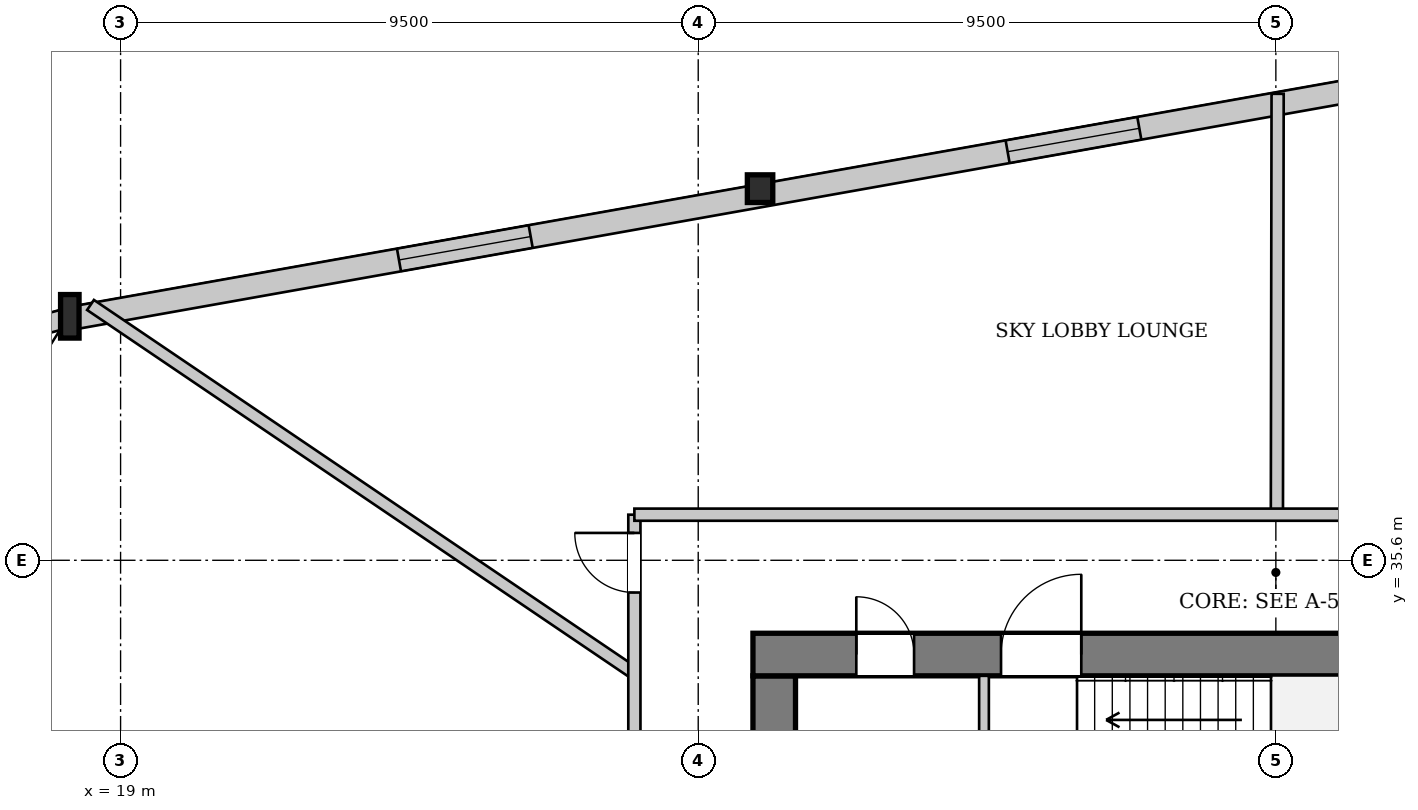
"""IFC4 building model, lengths in metres.
Left out: names, types, materials, properties, quantities, classifications, styles, units other than length and angle.
Written with IfcOpenShell. Run it as: python <this file> out.ifc"""

import sys

from ifc_helpers import new_model, si_unit, direction, frame, frame_2d, origin, origin_2d, place, context, subcontext, project, spatial, rectangle, i_section, extrude, source, transform, mapped, element, fill, save


model = new_model("IFC4")
c1 = context("Model", 3, precision=1e-05, world=origin(), true_north=direction((0.0, 1.0)))
c2 = subcontext(c1, "Body", "Model", "MODEL_VIEW")
j1 = project(units=[si_unit("LENGTHUNIT", "METRE"), si_unit("PLANEANGLEUNIT", "RADIAN")], contexts=[c1])
p1 = place(None, origin())
s1 = spatial("IfcSite", under=j1, at=p1, CompositionType="ELEMENT")
p2 = place(p1, origin())
s2 = spatial("IfcBuilding", under=s1, at=p2, CompositionType="ELEMENT")
p3 = place(p2, frame((0.0, 0.0, 138.1)))
s3 = spatial("IfcBuildingStorey", under=s2, at=p3, CompositionType="ELEMENT", Elevation=138.1)
m1 = source(origin(), c2, "Body", "SweptSolid", [
    extrude(i_section(OverallWidth=0.418, OverallDepth=0.455, WebThickness=0.038, FlangeThickness=0.059, at=origin_2d()), origin(), (0.0, 0.0, 1.0), 3.847),
])
p4 = place(p3, frame((29.633, 41.809, 0.0), z_axis=(-0.06041801268, -0.050454117732, 0.996897209219), x_axis=(0.640977101673, -0.767560000997, 0.0)))
e1 = element("IfcColumn", 1, at=p4, inside=s3, PredefinedType="COLUMN", context=c2, shape_type="MappedRepresentation", body=[
    mapped(m1, transform((0.0, 0.0, 0.0), x_axis=(1.0, 0.0, 0.0), y_axis=(0.0, 1.0, 0.0), z_axis=(0.0, 0.0, 1.0), scale=1.0)),
])
m2 = source(origin(), c2, "Body", "SweptSolid", [
    extrude(i_section(OverallWidth=0.304, OverallDepth=0.716, WebThickness=0.021, FlangeThickness=0.04, at=origin_2d()), origin(), (0.0, 0.0, 1.0), 3.855),
])
p5 = place(p3, frame((18.259, 39.786, 0.0), z_axis=(-0.048951982547, -0.089924728611, 0.994744814809), x_axis=(0.878297104228, -0.478115254625, 0.0)))
e2 = element("IfcColumn", 2, at=p5, inside=s3, PredefinedType="COLUMN", context=c2, shape_type="MappedRepresentation", body=[
    mapped(m2, transform((0.0, 0.0, 0.0), x_axis=(1.0, 0.0, 0.0), y_axis=(0.0, 1.0, 0.0), z_axis=(0.0, 0.0, 1.0), scale=1.0)),
])
p6 = place(p3, frame((19.829, 17.95, 0.0), z_axis=(0.0, 0.0, 1.0), x_axis=(-0.22713293769, 0.973863762862, 0.0)))
e3 = element("IfcWall", 3, at=p6, inside=s3, PredefinedType="SOLIDWALL", context=c2, shape_type="SweptSolid", body=[
    extrude(rectangle(XDim=18.042, YDim=0.38, at=frame_2d((9.021, 0.0))), origin(), (0.0, 0.0, 1.0), 2.972),
])
p7 = place(p6, frame((3.952, 0.0, 0.602)))
e4 = element("IfcOpeningElement", 4, at=p7, cuts=e3, PredefinedType="OPENING", context=c2, shape_type="SweptSolid", body=[
    extrude(rectangle(XDim=2.2, YDim=2.25, at=frame_2d((1.1, 1.125))), frame((0.0, 0.2, 0.0), z_axis=(0.0, -1.0, 0.0), x_axis=(1.0, 0.0, 0.0)), (0.0, 0.0, 1.0), 0.4),
])
p8 = place(p6, frame((11.89, 0.0, 0.602)))
e5 = element("IfcOpeningElement", 5, at=p8, cuts=e3, PredefinedType="OPENING", context=c2, shape_type="SweptSolid", body=[
    extrude(rectangle(XDim=2.2, YDim=2.25, at=frame_2d((1.1, 1.125))), frame((0.0, 0.2, 0.0), z_axis=(0.0, -1.0, 0.0), x_axis=(1.0, 0.0, 0.0)), (0.0, 0.0, 1.0), 0.4),
])
p9 = place(p3, frame((14.956, 38.729, 0.0), z_axis=(0.0, 0.0, 1.0), x_axis=(0.965504765996, 0.260385381385, 0.0)))
e6 = element("IfcWall", 6, at=p9, inside=s3, PredefinedType="SOLIDWALL", context=c2, shape_type="SweptSolid", body=[
    extrude(rectangle(XDim=3.465, YDim=0.32, at=frame_2d((1.732, 0.0))), origin(), (0.0, 0.0, 1.0), 2.972),
])
p10 = place(p9, frame((0.982, 0.0, 0.552)))
e7 = element("IfcOpeningElement", 7, at=p10, cuts=e6, PredefinedType="OPENING", context=c2, shape_type="SweptSolid", body=[
    extrude(rectangle(XDim=1.5, YDim=2.3, at=frame_2d((0.75, 1.15))), frame((0.0, 0.17, 0.0), z_axis=(0.0, -1.0, 0.0), x_axis=(1.0, 0.0, 0.0)), (0.0, 0.0, 1.0), 0.34),
])
p11 = place(p3, frame((18.292, 39.598, 0.0), z_axis=(0.0, 0.0, 1.0), x_axis=(0.98454939434, 0.175107081823, 0.0)))
e8 = element("IfcWall", 8, at=p11, inside=s3, PredefinedType="SOLIDWALL", context=c2, shape_type="SweptSolid", body=[
    extrude(rectangle(XDim=23.105, YDim=0.38, at=frame_2d((11.553, 0.0))), origin(), (0.0, 0.0, 1.0), 2.972),
])
p12 = place(p11, frame((5.369, 0.0, 0.602)))
e9 = element("IfcOpeningElement", 9, at=p12, cuts=e8, PredefinedType="OPENING", context=c2, shape_type="SweptSolid", body=[
    extrude(rectangle(XDim=2.2, YDim=2.25, at=frame_2d((1.1, 1.125))), frame((0.0, 0.2, 0.0), z_axis=(0.0, -1.0, 0.0), x_axis=(1.0, 0.0, 0.0)), (0.0, 0.0, 1.0), 0.4),
])
p13 = place(p11, frame((15.536, 0.0, 0.602)))
e10 = element("IfcOpeningElement", 10, at=p13, cuts=e8, PredefinedType="OPENING", context=c2, shape_type="SweptSolid", body=[
    extrude(rectangle(XDim=2.2, YDim=2.25, at=frame_2d((1.1, 1.125))), frame((0.0, 0.2, 0.0), z_axis=(0.0, -1.0, 0.0), x_axis=(1.0, 0.0, 0.0)), (0.0, 0.0, 1.0), 0.4),
])
p14 = place(p3, frame((29.75, 19.5, 0.0), z_axis=(0.0, 0.0, 1.0), x_axis=(0.0, 1.0, 0.0)))
e11 = element("IfcWall", 11, at=p14, inside=s3, PredefinedType="SHEAR", context=c2, shape_type="SweptSolid", body=[
    extrude(rectangle(XDim=14.2, YDim=0.7, at=frame_2d((7.1, 0.0))), origin(), (0.0, 0.0, 1.0), 3.58),
])
p15 = place(p14, frame((7.42, 0.0, 0.0)))
e12 = element("IfcOpeningElement", 12, at=p15, cuts=e11, PredefinedType="OPENING", context=c2, shape_type="SweptSolid", body=[
    extrude(rectangle(XDim=1.6, YDim=2.2, at=frame_2d((0.8, 1.1))), frame((0.0, 0.36, 0.0), z_axis=(0.0, -1.0, 0.0), x_axis=(1.0, 0.0, 0.0)), (0.0, 0.0, 1.0), 0.72),
])
p16 = place(p3, frame((29.4, 34.05, 0.0), z_axis=(0.0, 0.0, 1.0), x_axis=(1.0, 0.0, 0.0)))
e13 = element("IfcWall", 13, at=p16, inside=s3, PredefinedType="SHEAR", context=c2, shape_type="SweptSolid", body=[
    extrude(rectangle(XDim=17.2, YDim=0.7, at=frame_2d((8.6, 0.0))), origin(), (0.0, 0.0, 1.0), 3.58),
])
p17 = place(p16, frame((1.7, 0.0, 0.0)))
e14 = element("IfcOpeningElement", 14, at=p17, cuts=e13, PredefinedType="OPENING", context=c2, shape_type="SweptSolid", body=[
    extrude(rectangle(XDim=0.95, YDim=2.1, at=frame_2d((0.475, 1.05))), frame((0.0, 0.36, 0.0), z_axis=(0.0, -1.0, 0.0), x_axis=(1.0, 0.0, 0.0)), (0.0, 0.0, 1.0), 0.72),
])
p18 = place(p16, frame((4.08, 0.0, 0.0)))
e15 = element("IfcOpeningElement", 15, at=p18, cuts=e13, PredefinedType="OPENING", context=c2, shape_type="SweptSolid", body=[
    extrude(rectangle(XDim=1.32, YDim=2.2, at=frame_2d((0.66, 1.1))), frame((0.0, 0.36, 0.0), z_axis=(0.0, -1.0, 0.0), x_axis=(1.0, 0.0, 0.0)), (0.0, 0.0, 1.0), 0.72),
])
p19 = place(p16, frame((15.15, 0.0, 0.0)))
e16 = element("IfcOpeningElement", 16, at=p19, cuts=e13, PredefinedType="OPENING", context=c2, shape_type="SweptSolid", body=[
    extrude(rectangle(XDim=0.95, YDim=2.1, at=frame_2d((0.475, 1.05))), frame((0.0, 0.36, 0.0), z_axis=(0.0, -1.0, 0.0), x_axis=(1.0, 0.0, 0.0)), (0.0, 0.0, 1.0), 0.72),
])
p20 = place(p3, frame((33.2, 28.44, 0.0), z_axis=(0.0, 0.0, 1.0), x_axis=(0.0, 1.0, 0.0)))
e17 = element("IfcWall", 17, at=p20, inside=s3, PredefinedType="PARTITIONING", context=c2, shape_type="SweptSolid", body=[
    extrude(rectangle(XDim=5.26, YDim=0.16, at=frame_2d((2.63, 0.0))), origin(), (0.0, 0.0, 1.0), 3.58),
])
p21 = place(p3, frame((38.017, 36.35, 0.0), z_axis=(0.0, 0.0, 1.0), x_axis=(0.001728453448, 0.999998506223, 0.0)))
e18 = element("IfcWall", 18, at=p21, inside=s3, PredefinedType="PARTITIONING", context=c2, shape_type="SweptSolid", body=[
    extrude(rectangle(XDim=6.921, YDim=0.2, at=frame_2d((3.46, 0.0))), origin(), (0.0, 0.0, 1.0), 3.58),
])
p22 = place(p3, frame((27.45, 33.743, 0.0), z_axis=(0.0, 0.0, 1.0), x_axis=(-0.828061528822, 0.560637230734, 0.0)))
e19 = element("IfcWall", 19, at=p22, inside=s3, PredefinedType="PARTITIONING", context=c2, shape_type="SweptSolid", body=[
    extrude(rectangle(XDim=10.802, YDim=0.2, at=frame_2d((5.401, 0.0))), origin(), (0.0, 0.0, 1.0), 3.075),
])
p23 = place(p3, frame((27.45, 16.85, 0.0), z_axis=(0.0, 0.0, 1.0), x_axis=(0.0, 1.0, 0.0)))
e20 = element("IfcWall", 20, at=p23, inside=s3, PredefinedType="PARTITIONING", context=c2, shape_type="SweptSolid", body=[
    extrude(rectangle(XDim=19.5, YDim=0.2, at=frame_2d((9.75, 0.0))), origin(), (0.0, 0.0, 1.0), 3.58),
])
p24 = place(p23, frame((18.22, 0.0, 0.0)))
e21 = element("IfcOpeningElement", 21, at=p24, cuts=e20, PredefinedType="OPENING", context=c2, shape_type="SweptSolid", body=[
    extrude(rectangle(XDim=0.98, YDim=2.15, at=frame_2d((0.49, 1.075))), frame((0.0, 0.11, 0.0), z_axis=(0.0, -1.0, 0.0), x_axis=(1.0, 0.0, 0.0)), (0.0, 0.0, 1.0), 0.22),
])
p25 = place(p23, frame((11.145, 0.0, 0.0)))
e22 = element("IfcOpeningElement", 22, at=p25, cuts=e20, PredefinedType="OPENING", context=c2, shape_type="SweptSolid", body=[
    extrude(rectangle(XDim=0.98, YDim=2.15, at=frame_2d((0.49, 1.075))), frame((0.0, 0.11, 0.0), z_axis=(0.0, -1.0, 0.0), x_axis=(1.0, 0.0, 0.0)), (0.0, 0.0, 1.0), 0.22),
])
p26 = place(p3, frame((27.45, 36.35, 0.0), z_axis=(0.0, 0.0, 1.0), x_axis=(1.0, 0.0, 0.0)))
e23 = element("IfcWall", 23, at=p26, inside=s3, PredefinedType="PARTITIONING", context=c2, shape_type="SweptSolid", body=[
    extrude(rectangle(XDim=21.1, YDim=0.2, at=frame_2d((10.55, 0.0))), origin(), (0.0, 0.0, 1.0), 3.58),
])
p27 = place(p26, frame((19.2, 0.0, 0.0)))
e24 = element("IfcOpeningElement", 24, at=p27, cuts=e23, PredefinedType="OPENING", context=c2, shape_type="SweptSolid", body=[
    extrude(rectangle(XDim=1.6, YDim=2.2, at=frame_2d((0.8, 1.1))), frame((0.0, 0.11, 0.0), z_axis=(0.0, -1.0, 0.0), x_axis=(1.0, 0.0, 0.0)), (0.0, 0.0, 1.0), 0.22),
])
m3 = source(origin(), c2, "Body", "SweptSolid", [
    extrude(rectangle(XDim=2.2, YDim=2.25, at=frame_2d((1.1, 1.125))), frame((0.0, 0.03, 0.0), z_axis=(0.0, -1.0, 0.0), x_axis=(1.0, 0.0, 0.0)), (0.0, 0.0, 1.0), 0.06),
])
p28 = place(p12, origin())
e25 = element("IfcWindow", 25, at=p28, inside=s3, PartitioningType="SINGLE_PANEL", PredefinedType="WINDOW", context=c2, shape_type="MappedRepresentation", body=[
    mapped(m3, transform((0.0, 0.0, 0.0), x_axis=(1.0, 0.0, 0.0), y_axis=(0.0, 1.0, 0.0), z_axis=(0.0, 0.0, 1.0), scale=1.0)),
])
fill(e9, e25)
p29 = place(p13, origin())
e26 = element("IfcWindow", 26, at=p29, inside=s3, PartitioningType="SINGLE_PANEL", PredefinedType="WINDOW", context=c2, shape_type="MappedRepresentation", body=[
    mapped(m3, transform((0.0, 0.0, 0.0), x_axis=(1.0, 0.0, 0.0), y_axis=(0.0, 1.0, 0.0), z_axis=(0.0, 0.0, 1.0), scale=1.0)),
])
fill(e10, e26)
m4 = source(origin(), c2, "Body", "SweptSolid", [
    extrude(rectangle(XDim=0.95, YDim=2.1, at=frame_2d((0.475, 1.05))), frame((0.0, 0.025, 0.0), z_axis=(0.0, -1.0, 0.0), x_axis=(1.0, 0.0, 0.0)), (0.0, 0.0, 1.0), 0.05),
])
p30 = place(p17, origin())
e27 = element("IfcDoor", 27, at=p30, inside=s3, OperationType="SINGLE_SWING_LEFT", PredefinedType="DOOR", context=c2, shape_type="MappedRepresentation", body=[
    mapped(m4, transform((0.0, 0.0, 0.0), x_axis=(1.0, 0.0, 0.0), y_axis=(0.0, 1.0, 0.0), z_axis=(0.0, 0.0, 1.0), scale=1.0)),
])
fill(e14, e27)
m5 = source(origin(), c2, "Body", "SweptSolid", [
    extrude(rectangle(XDim=1.32, YDim=2.2, at=frame_2d((0.66, 1.1))), frame((0.0, 0.025, 0.0), z_axis=(0.0, -1.0, 0.0), x_axis=(1.0, 0.0, 0.0)), (0.0, 0.0, 1.0), 0.05),
])
p31 = place(p18, origin())
e28 = element("IfcDoor", 28, at=p31, inside=s3, OperationType="SINGLE_SWING_RIGHT", PredefinedType="DOOR", context=c2, shape_type="MappedRepresentation", body=[
    mapped(m5, transform((0.0, 0.0, 0.0), x_axis=(1.0, 0.0, 0.0), y_axis=(0.0, 1.0, 0.0), z_axis=(0.0, 0.0, 1.0), scale=1.0)),
])
fill(e15, e28)
m6 = source(origin(), c2, "Body", "SweptSolid", [
    extrude(rectangle(XDim=0.98, YDim=2.15, at=frame_2d((0.49, 1.075))), frame((0.0, 0.025, 0.0), z_axis=(0.0, -1.0, 0.0), x_axis=(1.0, 0.0, 0.0)), (0.0, 0.0, 1.0), 0.05),
])
p32 = place(p24, origin())
e29 = element("IfcDoor", 29, at=p32, inside=s3, OperationType="SINGLE_SWING_RIGHT", PredefinedType="DOOR", context=c2, shape_type="MappedRepresentation", body=[
    mapped(m6, transform((0.0, 0.0, 0.0), x_axis=(1.0, 0.0, 0.0), y_axis=(0.0, 1.0, 0.0), z_axis=(0.0, 0.0, 1.0), scale=1.0)),
])
fill(e21, e29)
save(model, sys.argv[1])
